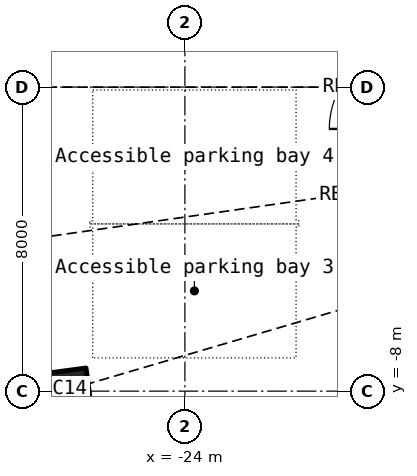
"""IFC4 building model, lengths in metres.
Left out: names, types, materials, properties, quantities, classifications, styles, units other than length and angle.
Written with IfcOpenShell. Run it as: python <this file> out.ifc"""

import sys

from ifc_helpers import new_model, si_unit, direction, frame, origin, origin_2d, place, context, subcontext, project, spatial, hollow_rectangle, extrude, element, save


model = new_model("IFC4")
c1 = context("Model", 3, precision=1e-05, world=origin(), true_north=direction((0.0, 1.0)))
c2 = subcontext(c1, "Body", "Model", "MODEL_VIEW")
j1 = project(units=[si_unit("LENGTHUNIT", "METRE"), si_unit("PLANEANGLEUNIT", "RADIAN")], contexts=[c1])
p1 = place(None, origin())
s1 = spatial("IfcSite", under=j1, at=p1, CompositionType="ELEMENT")
p2 = place(p1, origin())
s2 = spatial("IfcBuilding", under=s1, at=p2, CompositionType="ELEMENT")
p3 = place(p2, origin())
s3 = spatial("IfcBuildingStorey", under=s2, at=p3, CompositionType="ELEMENT", Elevation=0.0)
p4 = place(p3, frame((-28.442, 0.0, 0.0), z_axis=(0.03461234, 0.0, 0.999400813), x_axis=(0.0, 1.0, 0.0)))
e1 = element("IfcColumn", 1, at=p4, inside=s3, PredefinedType="COLUMN", context=c2, shape_type="SweptSolid", body=[
    extrude(hollow_rectangle(XDim=1.6, YDim=1.6, WallThickness=0.04, at=origin_2d()), origin(), (0.0, 0.0, 1.0), 7.004),
])
p5 = place(p3, frame((-28.311, -4.034, 0.0), z_axis=(0.034054879, 0.004914778, 0.99940788), x_axis=(-0.212173701, 0.977228962, 0.002424122)))
e2 = element("IfcColumn", 2, at=p5, inside=s3, PredefinedType="COLUMN", context=c2, shape_type="SweptSolid", body=[
    extrude(hollow_rectangle(XDim=1.0, YDim=1.0, WallThickness=0.032, at=origin_2d()), origin(), (0.0, 0.0, 1.0), 7.004),
])
p6 = place(p3, frame((-27.03, -7.951, 0.0), z_axis=(0.032486896, 0.009690297, 0.999425185), x_axis=(-0.409435953, 0.912327946, 0.00446314)))
e3 = element("IfcColumn", 3, at=p6, inside=s3, PredefinedType="COLUMN", context=c2, shape_type="SweptSolid", body=[
    extrude(hollow_rectangle(XDim=1.0, YDim=1.0, WallThickness=0.032, at=origin_2d()), origin(), (0.0, 0.0, 1.0), 7.004),
])
save(model, sys.argv[1])
